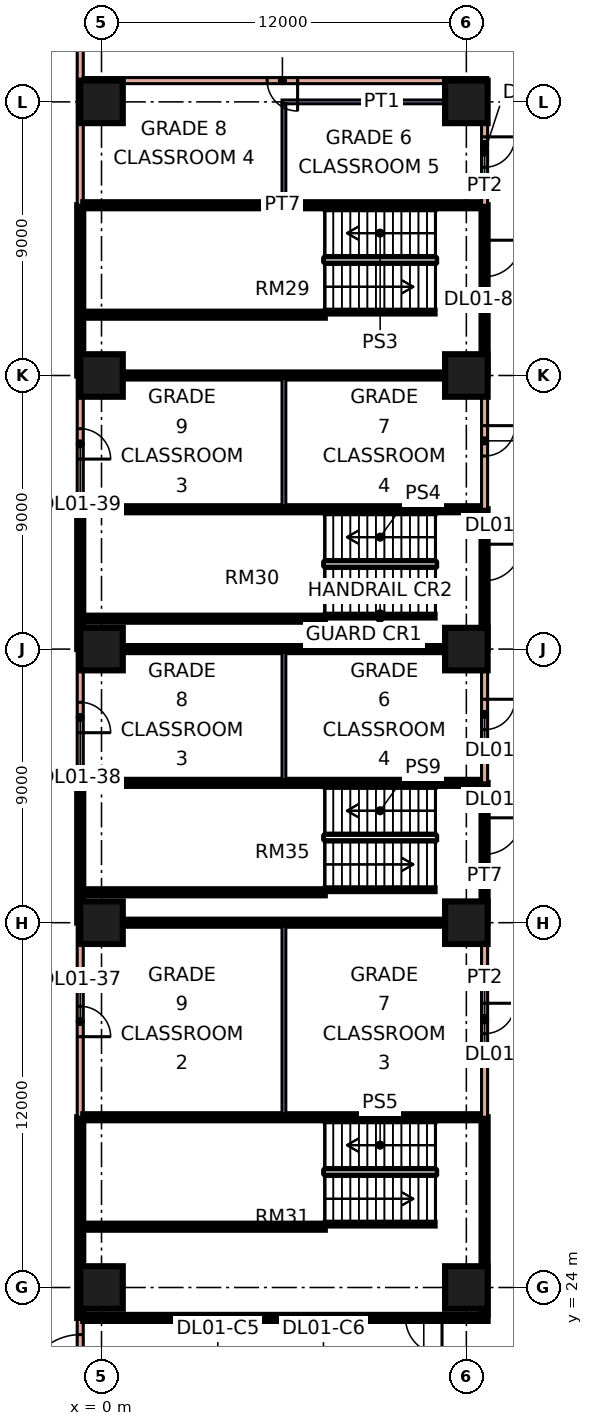
"""IFC4 building model, lengths in metres.
Left out: names, types, materials, properties, quantities, classifications, styles, units other than length and angle.
Written with IfcOpenShell. Run it as: python <this file> out.ifc"""

import sys

from ifc_helpers import new_model, si_unit, direction, frame, frame_2d, origin, origin_2d, place, context, subcontext, project, spatial, rectangle, extrude, element, fill, save


model = new_model("IFC4")
c1 = context("Model", 3, precision=1e-05, world=origin(), true_north=direction((0.0, 1.0)))
c2 = subcontext(c1, "Body", "Model", "MODEL_VIEW")
j1 = project(units=[si_unit("LENGTHUNIT", "METRE"), si_unit("PLANEANGLEUNIT", "RADIAN")], contexts=[c1])
p1 = place(None, origin())
s1 = spatial("IfcSite", under=j1, at=p1, CompositionType="ELEMENT")
p2 = place(p1, origin())
s2 = spatial("IfcBuilding", under=s1, at=p2, CompositionType="ELEMENT")
p3 = place(p2, frame((0.0, 0.0, 7.2)))
s3 = spatial("IfcBuildingStorey", under=s2, at=p3, CompositionType="ELEMENT", Elevation=7.2)
for number, where, z_axis, x_axis in (
    (1, (0.0, 24.0, 0.0), (0.0, 0.0, 1.0), (1.0, 0.0, 0.0)),
    (2, (12.0, 24.0, 0.0), (0.0, 0.0, 1.0), (1.0, 0.0, 0.0)),
    (3, (0.0, 36.0, 0.0), (0.0, 0.0, 1.0), (1.0, 0.0, 0.0)),
    (4, (12.0, 36.0, 0.0), (0.0, 0.0, 1.0), (1.0, 0.0, 0.0)),
    (5, (0.0, 45.0, 0.0), (0.0, 0.0, 1.0), (1.0, 0.0, 0.0)),
    (6, (12.0, 45.0, 0.0), (0.0, 0.0, 1.0), (1.0, 0.0, 0.0)),
    (7, (0.0, 54.0, 0.0), (0.0, 0.0, 1.0), (1.0, 0.0, 0.0)),
    (8, (12.0, 54.0, 0.0), (0.0, 0.0, 1.0), (1.0, 0.0, 0.0)),
    (9, (0.0, 63.0, 0.0), (0.0, 0.0, 1.0), (1.0, 0.0, 0.0)),
    (10, (12.0, 63.0, 0.0), (0.0, 0.0, 1.0), (1.0, 0.0, 0.0)),
):
    element("IfcColumn", number, at=place(p3, frame(where, z_axis=z_axis, x_axis=x_axis)), inside=s3, PredefinedType="COLUMN", context=c2, shape_type="SweptSolid", body=[
        extrude(rectangle(XDim=1.4, YDim=1.4, at=origin_2d()), origin(), (0.0, 0.0, 1.0), 4.8),
    ])
p4 = place(p3, frame((-0.7, -0.6, 0.0), z_axis=(0.0, 0.0, 1.0), x_axis=(0.0, 1.0, 0.0)))
e11 = element("IfcWall", 11, at=p4, inside=s3, PredefinedType="PARTITIONING", context=c2, shape_type="SweptSolid", body=[
    extrude(rectangle(XDim=23.6, YDim=0.2, at=frame_2d((11.8, 0.0))), origin(), (0.0, 0.0, 1.0), 4.4),
])
p5 = place(p4, frame((21.25, 0.0, 0.0)))
e12 = element("IfcOpeningElement", 12, at=p5, cuts=e11, PredefinedType="OPENING", context=c2, shape_type="SweptSolid", body=[
    extrude(rectangle(XDim=1.8, YDim=2.1, at=frame_2d((0.9, 1.05))), frame((0.0, 0.11, 0.0), z_axis=(0.0, -1.0, 0.0), x_axis=(1.0, 0.0, 0.0)), (0.0, 0.0, 1.0), 0.22),
])
p6 = place(p4, frame((13.5, 0.0, 0.0)))
e13 = element("IfcOpeningElement", 13, at=p6, cuts=e11, PredefinedType="OPENING", context=c2, shape_type="SweptSolid", body=[
    extrude(rectangle(XDim=1.0, YDim=2.1, at=frame_2d((0.5, 1.05))), frame((0.0, 0.11, 0.0), z_axis=(0.0, -1.0, 0.0), x_axis=(1.0, 0.0, 0.0)), (0.0, 0.0, 1.0), 0.22),
])
p7 = place(p3, frame((-0.7, 23.0, 0.0), z_axis=(0.0, 0.0, 1.0), x_axis=(0.0, 1.0, 0.0)))
e14 = element("IfcWall", 14, at=p7, inside=s3, PredefinedType="SOLIDWALL", context=c2, shape_type="SweptSolid", body=[
    extrude(rectangle(XDim=6.6, YDim=0.2, at=frame_2d((3.3, 0.0))), origin(), (0.0, 0.0, 1.0), 4.4),
])
p8 = place(p3, frame((-0.7, 29.6, 0.0), z_axis=(0.0, 0.0, 1.0), x_axis=(0.0, 1.0, 0.0)))
e15 = element("IfcWall", 15, at=p8, inside=s3, PredefinedType="PARTITIONING", context=c2, shape_type="SweptSolid", body=[
    extrude(rectangle(XDim=6.4, YDim=0.2, at=frame_2d((3.2, 0.0))), origin(), (0.0, 0.0, 1.0), 4.4),
])
p9 = place(p8, frame((2.65, 0.0, 0.0)))
e16 = element("IfcOpeningElement", 16, at=p9, cuts=e15, PredefinedType="OPENING", context=c2, shape_type="SweptSolid", body=[
    extrude(rectangle(XDim=1.0, YDim=2.1, at=frame_2d((0.5, 1.05))), frame((0.0, 0.11, 0.0), z_axis=(0.0, -1.0, 0.0), x_axis=(1.0, 0.0, 0.0)), (0.0, 0.0, 1.0), 0.22),
])
p10 = place(p3, frame((-0.7, 36.0, 0.0), z_axis=(0.0, 0.0, 1.0), x_axis=(0.0, 1.0, 0.0)))
e17 = element("IfcWall", 17, at=p10, inside=s3, PredefinedType="SOLIDWALL", context=c2, shape_type="SweptSolid", body=[
    extrude(rectangle(XDim=4.6, YDim=0.2, at=frame_2d((2.3, 0.0))), origin(), (0.0, 0.0, 1.0), 4.4),
])
p11 = place(p3, frame((-0.7, 40.6, 0.0), z_axis=(0.0, 0.0, 1.0), x_axis=(0.0, 1.0, 0.0)))
e18 = element("IfcWall", 18, at=p11, inside=s3, PredefinedType="PARTITIONING", context=c2, shape_type="SweptSolid", body=[
    extrude(rectangle(XDim=4.4, YDim=0.2, at=frame_2d((2.2, 0.0))), origin(), (0.0, 0.0, 1.0), 4.4),
])
p12 = place(p11, frame((1.65, 0.0, 0.0)))
e19 = element("IfcOpeningElement", 19, at=p12, cuts=e18, PredefinedType="OPENING", context=c2, shape_type="SweptSolid", body=[
    extrude(rectangle(XDim=1.0, YDim=2.1, at=frame_2d((0.5, 1.05))), frame((0.0, 0.11, 0.0), z_axis=(0.0, -1.0, 0.0), x_axis=(1.0, 0.0, 0.0)), (0.0, 0.0, 1.0), 0.22),
])
p13 = place(p3, frame((-0.7, 45.0, 0.0), z_axis=(0.0, 0.0, 1.0), x_axis=(0.0, 1.0, 0.0)))
e20 = element("IfcWall", 20, at=p13, inside=s3, PredefinedType="SOLIDWALL", context=c2, shape_type="SweptSolid", body=[
    extrude(rectangle(XDim=4.6, YDim=0.2, at=frame_2d((2.3, 0.0))), origin(), (0.0, 0.0, 1.0), 4.4),
])
p14 = place(p3, frame((-0.7, 49.6, 0.0), z_axis=(0.0, 0.0, 1.0), x_axis=(0.0, 1.0, 0.0)))
e21 = element("IfcWall", 21, at=p14, inside=s3, PredefinedType="PARTITIONING", context=c2, shape_type="SweptSolid", body=[
    extrude(rectangle(XDim=4.4, YDim=0.2, at=frame_2d((2.2, 0.0))), origin(), (0.0, 0.0, 1.0), 4.4),
])
p15 = place(p14, frame((1.65, 0.0, 0.0)))
e22 = element("IfcOpeningElement", 22, at=p15, cuts=e21, PredefinedType="OPENING", context=c2, shape_type="SweptSolid", body=[
    extrude(rectangle(XDim=1.0, YDim=2.1, at=frame_2d((0.5, 1.05))), frame((0.0, 0.11, 0.0), z_axis=(0.0, -1.0, 0.0), x_axis=(1.0, 0.0, 0.0)), (0.0, 0.0, 1.0), 0.22),
])
p16 = place(p3, frame((-0.7, 54.0, 0.0), z_axis=(0.0, 0.0, 1.0), x_axis=(0.0, 1.0, 0.0)))
e23 = element("IfcWall", 23, at=p16, inside=s3, PredefinedType="SOLIDWALL", context=c2, shape_type="SweptSolid", body=[
    extrude(rectangle(XDim=5.6, YDim=0.2, at=frame_2d((2.8, 0.0))), origin(), (0.0, 0.0, 1.0), 4.4),
])
p17 = place(p3, frame((-0.7, 59.6, 0.0), z_axis=(0.0, 0.0, 1.0), x_axis=(0.0, 1.0, 0.0)))
e24 = element("IfcWall", 24, at=p17, inside=s3, PredefinedType="PARTITIONING", context=c2, shape_type="SweptSolid", body=[
    extrude(rectangle(XDim=6.4, YDim=0.2, at=frame_2d((3.2, 0.0))), origin(), (0.0, 0.0, 1.0), 4.4),
])
p18 = place(p3, frame((-0.6, 23.0, 0.0), z_axis=(0.0, 0.0, 1.0), x_axis=(1.0, 0.0, 0.0)))
e25 = element("IfcWall", 25, at=p18, inside=s3, PredefinedType="SOLIDWALL", context=c2, shape_type="SweptSolid", body=[
    extrude(rectangle(XDim=13.3, YDim=0.2, at=frame_2d((6.65, 0.0))), origin(), (0.0, 0.0, 1.0), 4.4),
])
p19 = place(p18, frame((10.6, 0.0, 0.0)))
e26 = element("IfcOpeningElement", 26, at=p19, cuts=e25, PredefinedType="OPENING", context=c2, shape_type="SweptSolid", body=[
    extrude(rectangle(XDim=1.2, YDim=2.1, at=frame_2d((0.6, 1.05))), frame((0.0, 0.11, 0.0), z_axis=(0.0, -1.0, 0.0), x_axis=(1.0, 0.0, 0.0)), (0.0, 0.0, 1.0), 0.22),
])
for number, where, z_axis, x_axis in (
    (27, (-0.6, 29.6, 0.0), (0.0, 0.0, 1.0), (1.0, 0.0, 0.0)),
    (28, (-0.6, 36.0, 0.0), (0.0, 0.0, 1.0), (1.0, 0.0, 0.0)),
    (29, (-0.6, 40.6, 0.0), (0.0, 0.0, 1.0), (1.0, 0.0, 0.0)),
    (30, (-0.6, 45.0, 0.0), (0.0, 0.0, 1.0), (1.0, 0.0, 0.0)),
    (31, (-0.6, 49.6, 0.0), (0.0, 0.0, 1.0), (1.0, 0.0, 0.0)),
    (32, (-0.6, 54.0, 0.0), (0.0, 0.0, 1.0), (1.0, 0.0, 0.0)),
    (33, (-0.6, 59.6, 0.0), (0.0, 0.0, 1.0), (1.0, 0.0, 0.0)),
):
    element("IfcWall", number, at=place(p3, frame(where, z_axis=z_axis, x_axis=x_axis)), inside=s3, PredefinedType="SOLIDWALL", context=c2, shape_type="SweptSolid", body=[
        extrude(rectangle(XDim=13.1, YDim=0.2, at=frame_2d((6.55, 0.0))), origin(), (0.0, 0.0, 1.0), 4.4),
    ])
p20 = place(p3, frame((-0.6, 63.7, 0.0), z_axis=(0.0, 0.0, 1.0), x_axis=(1.0, 0.0, 0.0)))
e34 = element("IfcWall", 34, at=p20, inside=s3, PredefinedType="PARTITIONING", context=c2, shape_type="SweptSolid", body=[
    extrude(rectangle(XDim=13.3, YDim=0.2, at=frame_2d((6.65, 0.0))), origin(), (0.0, 0.0, 1.0), 4.4),
])
p21 = place(p20, frame((6.05, 0.0, 0.0)))
e35 = element("IfcOpeningElement", 35, at=p21, cuts=e34, PredefinedType="OPENING", context=c2, shape_type="SweptSolid", body=[
    extrude(rectangle(XDim=1.0, YDim=2.1, at=frame_2d((0.5, 1.05))), frame((0.0, 0.11, 0.0), z_axis=(0.0, -1.0, 0.0), x_axis=(1.0, 0.0, 0.0)), (0.0, 0.0, 1.0), 0.22),
])
p22 = place(p3, frame((5.938, 63.0, 0.0), z_axis=(0.0, 0.0, 1.0), x_axis=(1.0, 0.0, 0.0)))
e36 = element("IfcWall", 36, at=p22, inside=s3, PredefinedType="PARTITIONING", context=c2, shape_type="SweptSolid", body=[
    extrude(rectangle(XDim=6.562, YDim=0.125, at=frame_2d((3.281, 0.0))), origin(), (0.0, 0.0, 1.0), 4.4),
])
p23 = place(p3, frame((6.0, 29.7, 0.0), z_axis=(0.0, 0.0, 1.0), x_axis=(0.0, 1.0, 0.0)))
e37 = element("IfcWall", 37, at=p23, inside=s3, PredefinedType="PARTITIONING", context=c2, shape_type="SweptSolid", body=[
    extrude(rectangle(XDim=6.2, YDim=0.125, at=frame_2d((3.1, 0.0))), origin(), (0.0, 0.0, 1.0), 4.4),
])
for number, where, z_axis, x_axis in (
    (38, (6.0, 40.7, 0.0), (0.0, 0.0, 1.0), (0.0, 1.0, 0.0)),
    (39, (6.0, 49.7, 0.0), (0.0, 0.0, 1.0), (0.0, 1.0, 0.0)),
):
    element("IfcWall", number, at=place(p3, frame(where, z_axis=z_axis, x_axis=x_axis)), inside=s3, PredefinedType="PARTITIONING", context=c2, shape_type="SweptSolid", body=[
        extrude(rectangle(XDim=4.2, YDim=0.125, at=frame_2d((2.1, 0.0))), origin(), (0.0, 0.0, 1.0), 4.4),
    ])
p24 = place(p3, frame((6.0, 59.7, 0.0), z_axis=(0.0, 0.0, 1.0), x_axis=(0.0, 1.0, 0.0)))
e40 = element("IfcWall", 40, at=p24, inside=s3, PredefinedType="PARTITIONING", context=c2, shape_type="SweptSolid", body=[
    extrude(rectangle(XDim=3.238, YDim=0.125, at=frame_2d((1.619, 0.0))), origin(), (0.0, 0.0, 1.0), 4.4),
])
p25 = place(p3, frame((12.6, 23.1, 0.0), z_axis=(0.0, 0.0, 1.0), x_axis=(0.0, 1.0, 0.0)))
e41 = element("IfcWall", 41, at=p25, inside=s3, PredefinedType="SOLIDWALL", context=c2, shape_type="SweptSolid", body=[
    extrude(rectangle(XDim=6.5, YDim=0.2, at=frame_2d((3.25, 0.0))), origin(), (0.0, 0.0, 1.0), 4.4),
])
p26 = place(p3, frame((12.6, 29.6, 0.0), z_axis=(0.0, 0.0, 1.0), x_axis=(0.0, 1.0, 0.0)))
e42 = element("IfcWall", 42, at=p26, inside=s3, PredefinedType="PARTITIONING", context=c2, shape_type="SweptSolid", body=[
    extrude(rectangle(XDim=6.4, YDim=0.2, at=frame_2d((3.2, 0.0))), origin(), (0.0, 0.0, 1.0), 4.4),
])
p27 = place(p26, frame((2.75, 0.0, 0.0)))
e43 = element("IfcOpeningElement", 43, at=p27, cuts=e42, PredefinedType="OPENING", context=c2, shape_type="SweptSolid", body=[
    extrude(rectangle(XDim=1.0, YDim=2.1, at=frame_2d((0.5, 1.05))), frame((0.0, 0.11, 0.0), z_axis=(0.0, -1.0, 0.0), x_axis=(1.0, 0.0, 0.0)), (0.0, 0.0, 1.0), 0.22),
])
p28 = place(p3, frame((12.6, 36.0, 0.0), z_axis=(0.0, 0.0, 1.0), x_axis=(0.0, 1.0, 0.0)))
e44 = element("IfcWall", 44, at=p28, inside=s3, PredefinedType="SOLIDWALL", context=c2, shape_type="SweptSolid", body=[
    extrude(rectangle(XDim=4.6, YDim=0.2, at=frame_2d((2.3, 0.0))), origin(), (0.0, 0.0, 1.0), 4.4),
])
p29 = place(p28, frame((2.25, 0.0, 0.0)))
e45 = element("IfcOpeningElement", 45, at=p29, cuts=e44, PredefinedType="OPENING", context=c2, shape_type="SweptSolid", body=[
    extrude(rectangle(XDim=1.2, YDim=2.1, at=frame_2d((0.6, 1.05))), frame((0.0, 0.11, 0.0), z_axis=(0.0, -1.0, 0.0), x_axis=(1.0, 0.0, 0.0)), (0.0, 0.0, 1.0), 0.22),
])
p30 = place(p3, frame((12.6, 40.6, 0.0), z_axis=(0.0, 0.0, 1.0), x_axis=(0.0, 1.0, 0.0)))
e46 = element("IfcWall", 46, at=p30, inside=s3, PredefinedType="PARTITIONING", context=c2, shape_type="SweptSolid", body=[
    extrude(rectangle(XDim=4.4, YDim=0.2, at=frame_2d((2.2, 0.0))), origin(), (0.0, 0.0, 1.0), 4.4),
])
p31 = place(p30, frame((1.75, 0.0, 0.0)))
e47 = element("IfcOpeningElement", 47, at=p31, cuts=e46, PredefinedType="OPENING", context=c2, shape_type="SweptSolid", body=[
    extrude(rectangle(XDim=1.0, YDim=2.1, at=frame_2d((0.5, 1.05))), frame((0.0, 0.11, 0.0), z_axis=(0.0, -1.0, 0.0), x_axis=(1.0, 0.0, 0.0)), (0.0, 0.0, 1.0), 0.22),
])
p32 = place(p3, frame((12.6, 45.0, 0.0), z_axis=(0.0, 0.0, 1.0), x_axis=(0.0, 1.0, 0.0)))
e48 = element("IfcWall", 48, at=p32, inside=s3, PredefinedType="SOLIDWALL", context=c2, shape_type="SweptSolid", body=[
    extrude(rectangle(XDim=4.6, YDim=0.2, at=frame_2d((2.3, 0.0))), origin(), (0.0, 0.0, 1.0), 4.4),
])
p33 = place(p32, frame((2.25, 0.0, 0.0)))
e49 = element("IfcOpeningElement", 49, at=p33, cuts=e48, PredefinedType="OPENING", context=c2, shape_type="SweptSolid", body=[
    extrude(rectangle(XDim=1.2, YDim=2.1, at=frame_2d((0.6, 1.05))), frame((0.0, 0.11, 0.0), z_axis=(0.0, -1.0, 0.0), x_axis=(1.0, 0.0, 0.0)), (0.0, 0.0, 1.0), 0.22),
])
p34 = place(p3, frame((12.6, 49.6, 0.0), z_axis=(0.0, 0.0, 1.0), x_axis=(0.0, 1.0, 0.0)))
e50 = element("IfcWall", 50, at=p34, inside=s3, PredefinedType="PARTITIONING", context=c2, shape_type="SweptSolid", body=[
    extrude(rectangle(XDim=4.4, YDim=0.2, at=frame_2d((2.2, 0.0))), origin(), (0.0, 0.0, 1.0), 4.4),
])
p35 = place(p34, frame((1.75, 0.0, 0.0)))
e51 = element("IfcOpeningElement", 51, at=p35, cuts=e50, PredefinedType="OPENING", context=c2, shape_type="SweptSolid", body=[
    extrude(rectangle(XDim=1.0, YDim=2.1, at=frame_2d((0.5, 1.05))), frame((0.0, 0.11, 0.0), z_axis=(0.0, -1.0, 0.0), x_axis=(1.0, 0.0, 0.0)), (0.0, 0.0, 1.0), 0.22),
])
p36 = place(p3, frame((12.6, 54.0, 0.0), z_axis=(0.0, 0.0, 1.0), x_axis=(0.0, 1.0, 0.0)))
e52 = element("IfcWall", 52, at=p36, inside=s3, PredefinedType="SOLIDWALL", context=c2, shape_type="SweptSolid", body=[
    extrude(rectangle(XDim=5.6, YDim=0.2, at=frame_2d((2.8, 0.0))), origin(), (0.0, 0.0, 1.0), 4.4),
])
p37 = place(p36, frame((3.25, 0.0, 0.0)))
e53 = element("IfcOpeningElement", 53, at=p37, cuts=e52, PredefinedType="OPENING", context=c2, shape_type="SweptSolid", body=[
    extrude(rectangle(XDim=1.2, YDim=2.1, at=frame_2d((0.6, 1.05))), frame((0.0, 0.11, 0.0), z_axis=(0.0, -1.0, 0.0), x_axis=(1.0, 0.0, 0.0)), (0.0, 0.0, 1.0), 0.22),
])
p38 = place(p3, frame((12.6, 59.6, 0.0), z_axis=(0.0, 0.0, 1.0), x_axis=(0.0, 1.0, 0.0)))
e54 = element("IfcWall", 54, at=p38, inside=s3, PredefinedType="PARTITIONING", context=c2, shape_type="SweptSolid", body=[
    extrude(rectangle(XDim=4.0, YDim=0.2, at=frame_2d((2.0, 0.0))), origin(), (0.0, 0.0, 1.0), 4.4),
])
p39 = place(p38, frame((1.25, 0.0, 0.0)))
e55 = element("IfcOpeningElement", 55, at=p39, cuts=e54, PredefinedType="OPENING", context=c2, shape_type="SweptSolid", body=[
    extrude(rectangle(XDim=1.0, YDim=2.1, at=frame_2d((0.5, 1.05))), frame((0.0, 0.11, 0.0), z_axis=(0.0, -1.0, 0.0), x_axis=(1.0, 0.0, 0.0)), (0.0, 0.0, 1.0), 0.22),
])
for number, where, z_axis, x_axis in (
    (56, (-0.6, 56.0, 0.0), (0.0, 0.0, 1.0), (1.0, 0.0, 0.0)),
    (57, (-0.6, 46.0, 0.0), (0.0, 0.0, 1.0), (1.0, 0.0, 0.0)),
    (58, (-0.6, 26.0, 0.0), (0.0, 0.0, 1.0), (1.0, 0.0, 0.0)),
    (59, (-0.6, 37.0, 0.0), (0.0, 0.0, 1.0), (1.0, 0.0, 0.0)),
):
    element("IfcWall", number, at=place(p3, frame(where, z_axis=z_axis, x_axis=x_axis)), inside=s3, PredefinedType="SOLIDWALL", context=c2, shape_type="SweptSolid", body=[
        extrude(rectangle(XDim=7.945, YDim=0.2, at=frame_2d((3.973, 0.0))), origin(), (0.0, 0.0, 1.0), 4.4),
    ])
p40 = place(p27, origin())
e60 = element("IfcDoor", 60, at=p40, inside=s3, OperationType="SINGLE_SWING_RIGHT", PredefinedType="DOOR", context=c2, shape_type="SweptSolid", body=[
    extrude(rectangle(XDim=1.0, YDim=2.1, at=frame_2d((0.5, 1.05))), frame((0.0, 0.025, 0.0), z_axis=(0.0, -1.0, 0.0), x_axis=(1.0, 0.0, 0.0)), (0.0, 0.0, 1.0), 0.05),
])
fill(e43, e60)
p41 = place(p31, origin())
e61 = element("IfcDoor", 61, at=p41, inside=s3, OperationType="SINGLE_SWING_RIGHT", PredefinedType="DOOR", context=c2, shape_type="SweptSolid", body=[
    extrude(rectangle(XDim=1.0, YDim=2.1, at=frame_2d((0.5, 1.05))), frame((0.0, 0.025, 0.0), z_axis=(0.0, -1.0, 0.0), x_axis=(1.0, 0.0, 0.0)), (0.0, 0.0, 1.0), 0.05),
])
fill(e47, e61)
p42 = place(p35, origin())
e62 = element("IfcDoor", 62, at=p42, inside=s3, OperationType="SINGLE_SWING_RIGHT", PredefinedType="DOOR", context=c2, shape_type="SweptSolid", body=[
    extrude(rectangle(XDim=1.0, YDim=2.1, at=frame_2d((0.5, 1.05))), frame((0.0, 0.025, 0.0), z_axis=(0.0, -1.0, 0.0), x_axis=(1.0, 0.0, 0.0)), (0.0, 0.0, 1.0), 0.05),
])
fill(e51, e62)
p43 = place(p39, origin())
e63 = element("IfcDoor", 63, at=p43, inside=s3, OperationType="SINGLE_SWING_RIGHT", PredefinedType="DOOR", context=c2, shape_type="SweptSolid", body=[
    extrude(rectangle(XDim=1.0, YDim=2.1, at=frame_2d((0.5, 1.05))), frame((0.0, 0.025, 0.0), z_axis=(0.0, -1.0, 0.0), x_axis=(1.0, 0.0, 0.0)), (0.0, 0.0, 1.0), 0.05),
])
fill(e55, e63)
p44 = place(p9, frame((1.0, 0.0, 0.0), z_axis=(0.0, 0.0, 1.0), x_axis=(-1.0, 0.0, 0.0)))
e64 = element("IfcDoor", 64, at=p44, inside=s3, OperationType="SINGLE_SWING_LEFT", PredefinedType="DOOR", context=c2, shape_type="SweptSolid", body=[
    extrude(rectangle(XDim=1.0, YDim=2.1, at=frame_2d((0.5, 1.05))), frame((0.0, 0.025, 0.0), z_axis=(0.0, -1.0, 0.0), x_axis=(1.0, 0.0, 0.0)), (0.0, 0.0, 1.0), 0.05),
])
fill(e16, e64)
p45 = place(p12, frame((1.0, 0.0, 0.0), z_axis=(0.0, 0.0, 1.0), x_axis=(-1.0, 0.0, 0.0)))
e65 = element("IfcDoor", 65, at=p45, inside=s3, OperationType="SINGLE_SWING_LEFT", PredefinedType="DOOR", context=c2, shape_type="SweptSolid", body=[
    extrude(rectangle(XDim=1.0, YDim=2.1, at=frame_2d((0.5, 1.05))), frame((0.0, 0.025, 0.0), z_axis=(0.0, -1.0, 0.0), x_axis=(1.0, 0.0, 0.0)), (0.0, 0.0, 1.0), 0.05),
])
fill(e19, e65)
p46 = place(p15, frame((1.0, 0.0, 0.0), z_axis=(0.0, 0.0, 1.0), x_axis=(-1.0, 0.0, 0.0)))
e66 = element("IfcDoor", 66, at=p46, inside=s3, OperationType="SINGLE_SWING_LEFT", PredefinedType="DOOR", context=c2, shape_type="SweptSolid", body=[
    extrude(rectangle(XDim=1.0, YDim=2.1, at=frame_2d((0.5, 1.05))), frame((0.0, 0.025, 0.0), z_axis=(0.0, -1.0, 0.0), x_axis=(1.0, 0.0, 0.0)), (0.0, 0.0, 1.0), 0.05),
])
fill(e22, e66)
p47 = place(p21, origin())
e67 = element("IfcDoor", 67, at=p47, inside=s3, OperationType="SINGLE_SWING_RIGHT", PredefinedType="DOOR", context=c2, shape_type="SweptSolid", body=[
    extrude(rectangle(XDim=1.0, YDim=2.1, at=frame_2d((0.5, 1.05))), frame((0.0, 0.025, 0.0), z_axis=(0.0, -1.0, 0.0), x_axis=(1.0, 0.0, 0.0)), (0.0, 0.0, 1.0), 0.05),
])
fill(e35, e67)
p48 = place(p5, origin())
e68 = element("IfcDoor", 68, at=p48, inside=s3, OperationType="DOUBLE_DOOR_SINGLE_SWING", PredefinedType="DOOR", context=c2, shape_type="SweptSolid", body=[
    extrude(rectangle(XDim=1.8, YDim=2.1, at=frame_2d((0.9, 1.05))), frame((0.0, 0.025, 0.0), z_axis=(0.0, -1.0, 0.0), x_axis=(1.0, 0.0, 0.0)), (0.0, 0.0, 1.0), 0.05),
])
fill(e12, e68)
p49 = place(p37, origin())
e69 = element("IfcDoor", 69, at=p49, inside=s3, OperationType="SINGLE_SWING_RIGHT", PredefinedType="DOOR", context=c2, shape_type="SweptSolid", body=[
    extrude(rectangle(XDim=1.2, YDim=2.1, at=frame_2d((0.6, 1.05))), frame((0.0, 0.025, 0.0), z_axis=(0.0, -1.0, 0.0), x_axis=(1.0, 0.0, 0.0)), (0.0, 0.0, 1.0), 0.05),
])
fill(e53, e69)
p50 = place(p33, origin())
e70 = element("IfcDoor", 70, at=p50, inside=s3, OperationType="SINGLE_SWING_RIGHT", PredefinedType="DOOR", context=c2, shape_type="SweptSolid", body=[
    extrude(rectangle(XDim=1.2, YDim=2.1, at=frame_2d((0.6, 1.05))), frame((0.0, 0.025, 0.0), z_axis=(0.0, -1.0, 0.0), x_axis=(1.0, 0.0, 0.0)), (0.0, 0.0, 1.0), 0.05),
])
fill(e49, e70)
p51 = place(p19, origin())
e71 = element("IfcDoor", 71, at=p51, inside=s3, OperationType="SINGLE_SWING_RIGHT", PredefinedType="DOOR", context=c2, shape_type="SweptSolid", body=[
    extrude(rectangle(XDim=1.2, YDim=2.1, at=frame_2d((0.6, 1.05))), frame((0.0, 0.025, 0.0), z_axis=(0.0, -1.0, 0.0), x_axis=(1.0, 0.0, 0.0)), (0.0, 0.0, 1.0), 0.05),
])
fill(e26, e71)
p52 = place(p29, origin())
e72 = element("IfcDoor", 72, at=p52, inside=s3, OperationType="SINGLE_SWING_RIGHT", PredefinedType="DOOR", context=c2, shape_type="SweptSolid", body=[
    extrude(rectangle(XDim=1.2, YDim=2.1, at=frame_2d((0.6, 1.05))), frame((0.0, 0.025, 0.0), z_axis=(0.0, -1.0, 0.0), x_axis=(1.0, 0.0, 0.0)), (0.0, 0.0, 1.0), 0.05),
])
fill(e45, e72)
save(model, sys.argv[1])
